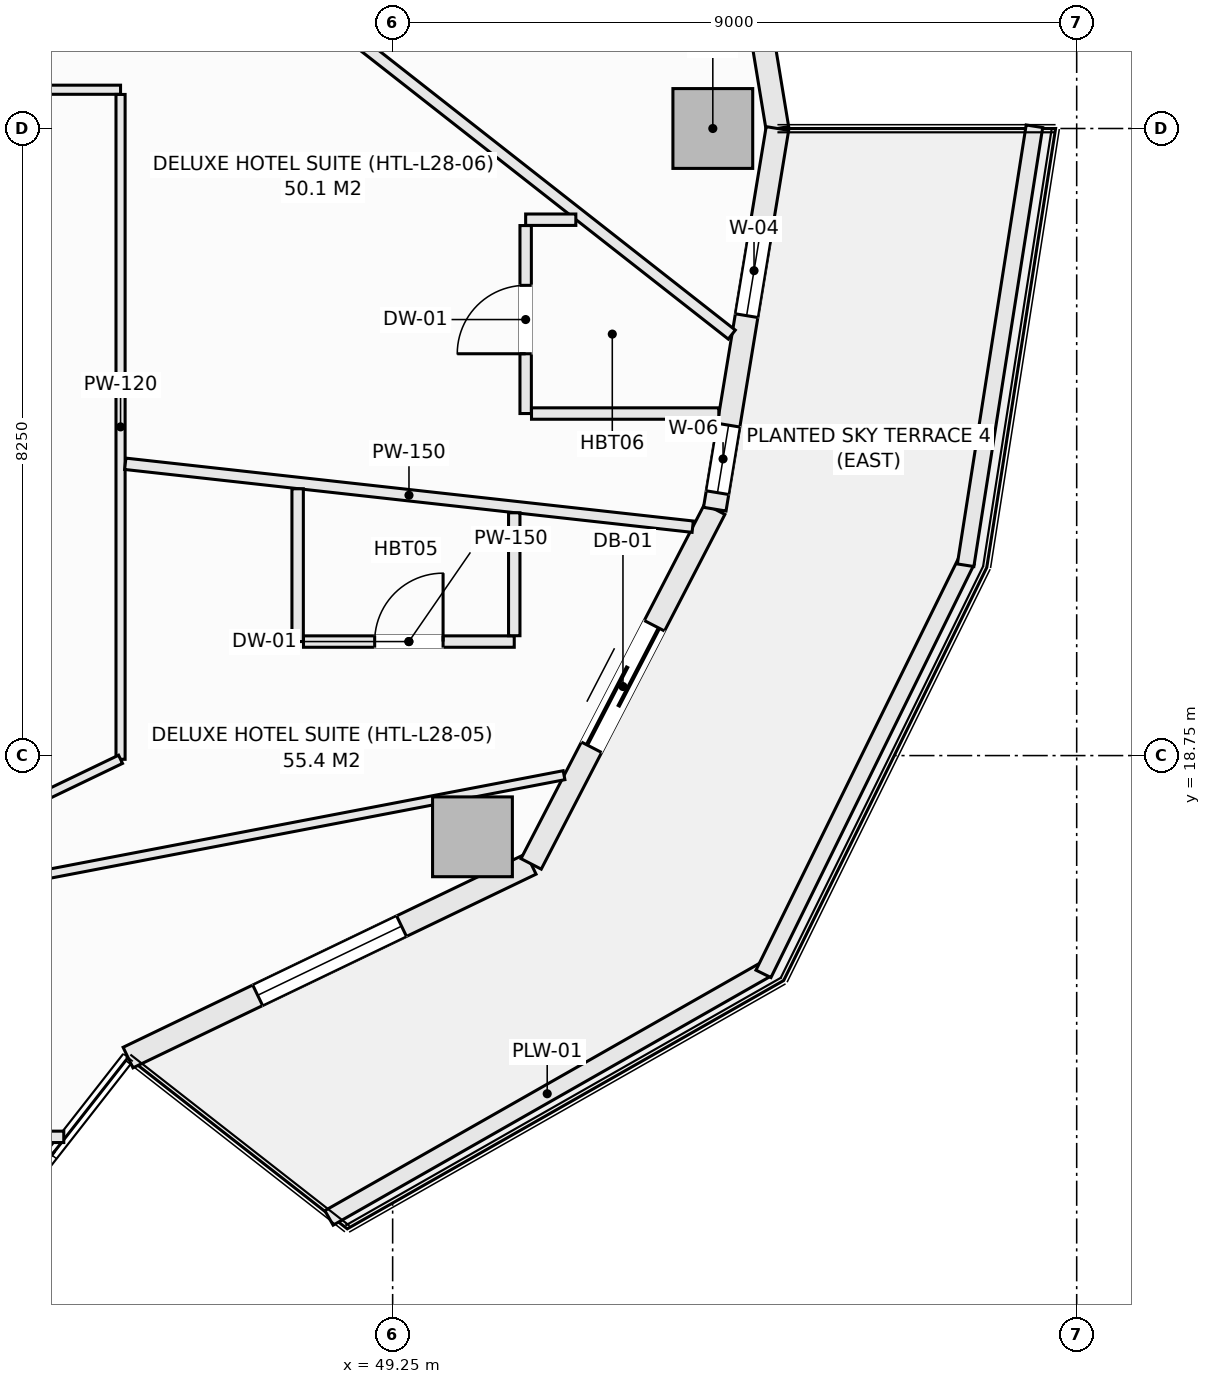
"""IFC4 building model, lengths in metres.
Left out: names, types, materials, properties, quantities, classifications, styles, units other than length and angle.
Written with IfcOpenShell. Run it as: python <this file> out.ifc"""

import sys

from ifc_helpers import new_model, si_unit, direction, frame, frame_2d, origin, origin_2d, place, context, subcontext, project, spatial, rectangle, extrude, element, fill, save


model = new_model("IFC4")
c1 = context("Model", 3, precision=1e-05, world=origin(), true_north=direction((0.0, 1.0)))
c2 = subcontext(c1, "Body", "Model", "MODEL_VIEW")
j1 = project(units=[si_unit("LENGTHUNIT", "METRE"), si_unit("PLANEANGLEUNIT", "RADIAN")], contexts=[c1])
p1 = place(None, origin())
s1 = spatial("IfcSite", under=j1, at=p1, CompositionType="ELEMENT")
p2 = place(p1, origin())
s2 = spatial("IfcBuilding", under=s1, at=p2, CompositionType="ELEMENT")
p3 = place(p2, frame((0.0, 0.0, 115.5)))
s3 = spatial("IfcBuildingStorey", under=s2, at=p3, CompositionType="ELEMENT", Elevation=115.5)
for number, where, z_axis, x_axis in (
    (1, (53.462, 27.0, -0.27), (0.0, 0.0, 1.0), (1.0, 0.0, 0.0)),
    (2, (50.3, 17.681, -0.27), (0.0, 0.0, 1.0), (1.0, 0.0, 0.0)),
):
    element("IfcColumn", number, at=place(p3, frame(where, z_axis=z_axis, x_axis=x_axis)), inside=s3, PredefinedType="COLUMN", context=c2, shape_type="SweptSolid", body=[
        extrude(rectangle(XDim=1.05, YDim=1.05, at=origin_2d()), origin(), (0.0, 0.0, 1.0), 3.4),
    ])
p4 = place(p3, frame((53.488, 32.008, 0.0), z_axis=(0.0, 0.0, 1.0), x_axis=(0.162393944769, -0.986726003864, 0.0)))
e3 = element("IfcWall", 3, at=p4, inside=s3, PredefinedType="SOLIDWALL", context=c2, shape_type="SweptSolid", body=[
    extrude(rectangle(XDim=5.075, YDim=0.3, at=frame_2d((2.538, 0.0))), origin(), (0.0, 0.0, 1.0), 2.653),
])
p5 = place(p4, frame((1.488, 0.0, 0.74)))
e4 = element("IfcOpeningElement", 4, at=p5, cuts=e3, PredefinedType="OPENING", context=c2, shape_type="SweptSolid", body=[
    extrude(rectangle(XDim=2.1, YDim=1.7, at=frame_2d((1.05, 0.85))), frame((0.0, 0.16, 0.0), z_axis=(0.0, -1.0, 0.0), x_axis=(1.0, 0.0, 0.0)), (0.0, 0.0, 1.0), 0.32),
])
p6 = place(p3, frame((45.769, 14.777, 0.0), z_axis=(0.0, 0.0, 1.0), x_axis=(0.901370184739, 0.433049408339, 0.0)))
e5 = element("IfcWall", 5, at=p6, inside=s3, PredefinedType="SOLIDWALL", context=c2, shape_type="SweptSolid", body=[
    extrude(rectangle(XDim=5.884, YDim=0.3, at=frame_2d((2.942, 0.0))), origin(), (0.0, 0.0, 1.0), 2.653),
])
p7 = place(p6, frame((1.892, 0.0, 0.74)))
e6 = element("IfcOpeningElement", 6, at=p7, cuts=e5, PredefinedType="OPENING", context=c2, shape_type="SweptSolid", body=[
    extrude(rectangle(XDim=2.1, YDim=1.7, at=frame_2d((1.05, 0.85))), frame((0.0, 0.16, 0.0), z_axis=(0.0, -1.0, 0.0), x_axis=(1.0, 0.0, 0.0)), (0.0, 0.0, 1.0), 0.32),
])
p8 = place(p3, frame((51.072, 17.325, 0.0), z_axis=(0.0, 0.0, 1.0), x_axis=(0.459767899643, 0.888039119892, 0.0)))
e7 = element("IfcWall", 7, at=p8, inside=s3, PredefinedType="SOLIDWALL", context=c2, shape_type="SweptSolid", body=[
    extrude(rectangle(XDim=5.255, YDim=0.3, at=frame_2d((2.628, 0.0))), origin(), (0.0, 0.0, 1.0), 2.653),
])
p9 = place(p8, frame((1.728, 0.0, 0.0)))
e8 = element("IfcOpeningElement", 8, at=p9, cuts=e7, PredefinedType="OPENING", context=c2, shape_type="SweptSolid", body=[
    extrude(rectangle(XDim=1.8, YDim=2.25, at=frame_2d((0.9, 1.125))), frame((0.0, 0.16, 0.0), z_axis=(0.0, -1.0, 0.0), x_axis=(1.0, 0.0, 0.0)), (0.0, 0.0, 1.0), 0.32),
])
p10 = place(p3, frame((53.488, 21.992, 0.0), z_axis=(0.0, 0.0, 1.0), x_axis=(0.162393944769, 0.986726003864, 0.0)))
e9 = element("IfcWall", 9, at=p10, inside=s3, PredefinedType="SOLIDWALL", context=c2, shape_type="SweptSolid", body=[
    extrude(rectangle(XDim=5.075, YDim=0.3, at=frame_2d((2.538, 0.0))), origin(), (0.0, 0.0, 1.0), 2.653),
])
p11 = place(p10, frame((2.58, 0.0, 0.72)))
e10 = element("IfcOpeningElement", 10, at=p11, cuts=e9, PredefinedType="OPENING", context=c2, shape_type="SweptSolid", body=[
    extrude(rectangle(XDim=1.2, YDim=1.65, at=frame_2d((0.6, 0.825))), frame((0.0, 0.16, 0.0), z_axis=(0.0, -1.0, 0.0), x_axis=(1.0, 0.0, 0.0)), (0.0, 0.0, 1.0), 0.32),
])
p12 = place(p10, frame((0.22, 0.0, 0.72)))
e11 = element("IfcOpeningElement", 11, at=p12, cuts=e9, PredefinedType="OPENING", context=c2, shape_type="SweptSolid", body=[
    extrude(rectangle(XDim=0.9, YDim=1.65, at=frame_2d((0.45, 0.825))), frame((0.0, 0.16, 0.0), z_axis=(0.0, -1.0, 0.0), x_axis=(1.0, 0.0, 0.0)), (0.0, 0.0, 1.0), 0.32),
])
p13 = place(p3, frame((48.413, 12.668, 0.0), z_axis=(0.0, 0.0, 1.0), x_axis=(0.869187658335, 0.494482370361, 0.0)))
e12 = element("IfcWall", 12, at=p13, inside=s3, PredefinedType="PARAPET", context=c2, shape_type="SweptSolid", body=[
    extrude(rectangle(XDim=6.606, YDim=0.22, at=frame_2d((3.303, 0.0))), origin(), (0.0, 0.0, 1.0), 0.52),
])
p14 = place(p3, frame((54.129, 15.878, 0.0), z_axis=(0.0, 0.0, 1.0), x_axis=(0.441269631716, 0.897374566235, 0.0)))
e13 = element("IfcWall", 13, at=p14, inside=s3, PredefinedType="PARAPET", context=c2, shape_type="SweptSolid", body=[
    extrude(rectangle(XDim=6.056, YDim=0.22, at=frame_2d((3.028, 0.0))), origin(), (0.0, 0.0, 1.0), 0.52),
])
p15 = place(p3, frame((56.789, 21.254, 0.0), z_axis=(0.0, 0.0, 1.0), x_axis=(0.154903030247, 0.987929679289, 0.0)))
e14 = element("IfcWall", 14, at=p15, inside=s3, PredefinedType="PARAPET", context=c2, shape_type="SweptSolid", body=[
    extrude(rectangle(XDim=5.846, YDim=0.22, at=frame_2d((2.923, 0.0))), origin(), (0.0, 0.0, 1.0), 0.52),
])
p16 = place(p3, frame((43.812, 27.51, 0.0), z_axis=(0.0, 0.0, 1.0), x_axis=(1.0, 0.0, 0.0)))
e15 = element("IfcWall", 15, at=p16, inside=s3, PredefinedType="PARTITIONING", context=c2, shape_type="SweptSolid", body=[
    extrude(rectangle(XDim=1.858, YDim=0.12, at=frame_2d((0.929, 0.0))), origin(), (0.0, 0.0, 1.0), 3.13),
])
p17 = place(p3, frame((45.67, 18.701, 0.0), z_axis=(0.0, 0.0, 1.0), x_axis=(0.0, 1.0, 0.0)))
e16 = element("IfcWall", 16, at=p17, inside=s3, PredefinedType="PARTITIONING", context=c2, shape_type="SweptSolid", body=[
    extrude(rectangle(XDim=8.747, YDim=0.12, at=frame_2d((4.374, 0.0))), origin(), (0.0, 0.0, 1.0), 3.13),
])
p18 = place(p3, frame((43.812, 17.809, 0.0), z_axis=(0.0, 0.0, 1.0), x_axis=(0.901467594949, 0.432846595525, 0.0)))
e17 = element("IfcWall", 17, at=p18, inside=s3, PredefinedType="PARTITIONING", context=c2, shape_type="SweptSolid", body=[
    extrude(rectangle(XDim=2.061, YDim=0.12, at=frame_2d((1.031, 0.0))), origin(), (0.0, 0.0, 1.0), 3.13),
])
p19 = place(p3, frame((45.732, 22.589, 0.0), z_axis=(0.0, 0.0, 1.0), x_axis=(0.993915007742, -0.110149704422, 0.0)))
e18 = element("IfcWall", 18, at=p19, inside=s3, PredefinedType="PARTITIONING", context=c2, shape_type="SweptSolid", body=[
    extrude(rectangle(XDim=7.511, YDim=0.15, at=frame_2d((3.756, 0.0))), origin(), (0.0, 0.0, 1.0), 3.13),
])
p20 = place(p3, frame((39.082, 16.114, 0.0), z_axis=(0.0, 0.0, 1.0), x_axis=(0.982162094293, 0.188036221334, 0.0)))
e19 = element("IfcWall", 19, at=p20, inside=s3, PredefinedType="PARTITIONING", context=c2, shape_type="SweptSolid", body=[
    extrude(rectangle(XDim=12.649, YDim=0.12, at=frame_2d((6.324, 0.0))), origin(), (0.0, 0.0, 1.0), 2.702),
])
p21 = place(p3, frame((42.0, 13.734, 0.0), z_axis=(0.0, 0.0, 1.0), x_axis=(1.0, 0.0, 0.0)))
e20 = element("IfcWall", 20, at=p21, inside=s3, PredefinedType="PARTITIONING", context=c2, shape_type="SweptSolid", body=[
    extrude(rectangle(XDim=2.923, YDim=0.15, at=frame_2d((1.461, 0.0))), origin(), (0.0, 0.0, 1.0), 3.13),
])
p22 = place(p21, frame((1.011, 0.0, 0.0)))
e21 = element("IfcOpeningElement", 21, at=p22, cuts=e20, PredefinedType="OPENING", context=c2, shape_type="SweptSolid", body=[
    extrude(rectangle(XDim=0.9, YDim=2.1, at=frame_2d((0.45, 1.05))), frame((0.0, 0.085, 0.0), z_axis=(0.0, -1.0, 0.0), x_axis=(1.0, 0.0, 0.0)), (0.0, 0.0, 1.0), 0.17),
])
p23 = place(p3, frame((48.0, 20.25, 0.0), z_axis=(0.0, 0.0, 1.0), x_axis=(0.0, 1.0, 0.0)))
e22 = element("IfcWall", 22, at=p23, inside=s3, PredefinedType="PARTITIONING", context=c2, shape_type="SweptSolid", body=[
    extrude(rectangle(XDim=2.01, YDim=0.15, at=frame_2d((1.005, 0.0))), origin(), (0.0, 0.0, 1.0), 3.13),
])
p24 = place(p3, frame((48.077, 20.25, 0.0), z_axis=(0.0, 0.0, 1.0), x_axis=(1.0, 0.0, 0.0)))
e23 = element("IfcWall", 23, at=p24, inside=s3, PredefinedType="PARTITIONING", context=c2, shape_type="SweptSolid", body=[
    extrude(rectangle(XDim=2.773, YDim=0.15, at=frame_2d((1.387, 0.0))), origin(), (0.0, 0.0, 1.0), 3.13),
])
p25 = place(p24, frame((0.937, 0.0, 0.0)))
e24 = element("IfcOpeningElement", 24, at=p25, cuts=e23, PredefinedType="OPENING", context=c2, shape_type="SweptSolid", body=[
    extrude(rectangle(XDim=0.9, YDim=2.1, at=frame_2d((0.45, 1.05))), frame((0.0, 0.085, 0.0), z_axis=(0.0, -1.0, 0.0), x_axis=(1.0, 0.0, 0.0)), (0.0, 0.0, 1.0), 0.17),
])
p26 = place(p3, frame((50.85, 20.327, 0.0), z_axis=(0.0, 0.0, 1.0), x_axis=(0.0, 1.0, 0.0)))
e25 = element("IfcWall", 25, at=p26, inside=s3, PredefinedType="PARTITIONING", context=c2, shape_type="SweptSolid", body=[
    extrude(rectangle(XDim=1.617, YDim=0.15, at=frame_2d((0.809, 0.0))), origin(), (0.0, 0.0, 1.0), 3.13),
])
p27 = place(p3, frame((45.258, 30.919, 0.0), z_axis=(0.0, 0.0, 1.0), x_axis=(0.786869212034, -0.617119796436, 0.0)))
e26 = element("IfcWall", 26, at=p27, inside=s3, PredefinedType="PARTITIONING", context=c2, shape_type="SweptSolid", body=[
    extrude(rectangle(XDim=10.744, YDim=0.15, at=frame_2d((5.372, 0.0))), origin(), (0.0, 0.0, 1.0), 2.505),
])
p28 = place(p3, frame((51.0, 25.8, 0.0), z_axis=(0.0, 0.0, 1.0), x_axis=(1.0, 0.0, 0.0)))
e27 = element("IfcWall", 27, at=p28, inside=s3, PredefinedType="PARTITIONING", context=c2, shape_type="SweptSolid", body=[
    extrude(rectangle(XDim=0.66, YDim=0.15, at=frame_2d((0.33, 0.0))), origin(), (0.0, 0.0, 1.0), 3.13),
])
p29 = place(p3, frame((51.0, 23.25, 0.0), z_axis=(0.0, 0.0, 1.0), x_axis=(0.0, 1.0, 0.0)))
e28 = element("IfcWall", 28, at=p29, inside=s3, PredefinedType="PARTITIONING", context=c2, shape_type="SweptSolid", body=[
    extrude(rectangle(XDim=2.473, YDim=0.15, at=frame_2d((1.236, 0.0))), origin(), (0.0, 0.0, 1.0), 3.13),
])
p30 = place(p29, frame((0.787, 0.0, 0.0)))
e29 = element("IfcOpeningElement", 29, at=p30, cuts=e28, PredefinedType="OPENING", context=c2, shape_type="SweptSolid", body=[
    extrude(rectangle(XDim=0.9, YDim=2.1, at=frame_2d((0.45, 1.05))), frame((0.0, 0.085, 0.0), z_axis=(0.0, -1.0, 0.0), x_axis=(1.0, 0.0, 0.0)), (0.0, 0.0, 1.0), 0.17),
])
p31 = place(p3, frame((51.077, 23.25, 0.0), z_axis=(0.0, 0.0, 1.0), x_axis=(1.0, 0.0, 0.0)))
e30 = element("IfcWall", 30, at=p31, inside=s3, PredefinedType="PARTITIONING", context=c2, shape_type="SweptSolid", body=[
    extrude(rectangle(XDim=2.464, YDim=0.15, at=frame_2d((1.232, 0.0))), origin(), (0.0, 0.0, 1.0), 3.13),
])
p32 = place(p7, origin())
e31 = element("IfcWindow", 31, at=p32, inside=s3, PartitioningType="SINGLE_PANEL", PredefinedType="WINDOW", context=c2, shape_type="SweptSolid", body=[
    extrude(rectangle(XDim=2.1, YDim=1.7, at=frame_2d((1.05, 0.85))), frame((0.0, 0.03, 0.0), z_axis=(0.0, -1.0, 0.0), x_axis=(1.0, 0.0, 0.0)), (0.0, 0.0, 1.0), 0.06),
])
fill(e6, e31)
p33 = place(p9, frame((1.8, 0.0, 0.0), z_axis=(0.0, 0.0, 1.0), x_axis=(-1.0, 0.0, 0.0)))
e32 = element("IfcDoor", 32, at=p33, inside=s3, OperationType="SLIDING_TO_LEFT", PredefinedType="DOOR", context=c2, shape_type="SweptSolid", body=[
    extrude(rectangle(XDim=1.8, YDim=2.25, at=frame_2d((0.9, 1.125))), frame((0.0, 0.025, 0.0), z_axis=(0.0, -1.0, 0.0), x_axis=(1.0, 0.0, 0.0)), (0.0, 0.0, 1.0), 0.05),
])
fill(e8, e32)
p34 = place(p11, origin())
e33 = element("IfcWindow", 33, at=p34, inside=s3, PartitioningType="SINGLE_PANEL", PredefinedType="WINDOW", context=c2, shape_type="SweptSolid", body=[
    extrude(rectangle(XDim=1.2, YDim=1.65, at=frame_2d((0.6, 0.825))), frame((0.0, 0.03, 0.0), z_axis=(0.0, -1.0, 0.0), x_axis=(1.0, 0.0, 0.0)), (0.0, 0.0, 1.0), 0.06),
])
fill(e10, e33)
p35 = place(p25, origin())
e34 = element("IfcDoor", 34, at=p35, inside=s3, OperationType="SINGLE_SWING_RIGHT", PredefinedType="DOOR", context=c2, shape_type="SweptSolid", body=[
    extrude(rectangle(XDim=0.9, YDim=2.1, at=frame_2d((0.45, 1.05))), frame((0.0, 0.025, 0.0), z_axis=(0.0, -1.0, 0.0), x_axis=(1.0, 0.0, 0.0)), (0.0, 0.0, 1.0), 0.05),
])
fill(e24, e34)
p36 = place(p30, origin())
e35 = element("IfcDoor", 35, at=p36, inside=s3, OperationType="SINGLE_SWING_LEFT", PredefinedType="DOOR", context=c2, shape_type="SweptSolid", body=[
    extrude(rectangle(XDim=0.9, YDim=2.1, at=frame_2d((0.45, 1.05))), frame((0.0, 0.025, 0.0), z_axis=(0.0, -1.0, 0.0), x_axis=(1.0, 0.0, 0.0)), (0.0, 0.0, 1.0), 0.05),
])
fill(e29, e35)
p37 = place(p12, origin())
e36 = element("IfcWindow", 36, at=p37, inside=s3, PartitioningType="SINGLE_PANEL", PredefinedType="WINDOW", context=c2, shape_type="SweptSolid", body=[
    extrude(rectangle(XDim=0.9, YDim=1.65, at=frame_2d((0.45, 0.825))), frame((0.0, 0.03, 0.0), z_axis=(0.0, -1.0, 0.0), x_axis=(1.0, 0.0, 0.0)), (0.0, 0.0, 1.0), 0.06),
])
fill(e11, e36)
save(model, sys.argv[1])
